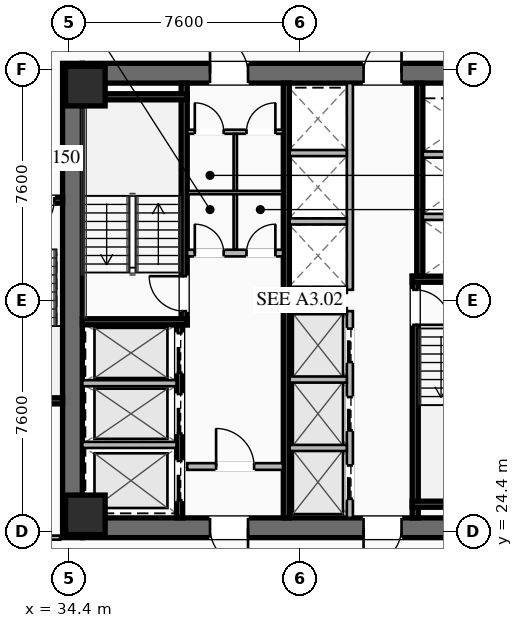
"""IFC4 building model, lengths in metres.
Left out: names, types, materials, properties, quantities, classifications, styles, units other than length and angle.
Written with IfcOpenShell. Run it as: python <this file> out.ifc"""

import sys

from ifc_helpers import new_model, si_unit, direction, frame, frame_2d, origin, origin_2d, place, context, subcontext, project, spatial, rectangle, hollow_rectangle, extrude, element, fill, save


model = new_model("IFC4")
c1 = context("Model", 3, precision=1e-05, world=origin(), true_north=direction((0.0, 1.0)))
c2 = subcontext(c1, "Body", "Model", "MODEL_VIEW")
j1 = project(units=[si_unit("LENGTHUNIT", "METRE"), si_unit("PLANEANGLEUNIT", "RADIAN")], contexts=[c1])
p1 = place(None, origin())
s1 = spatial("IfcSite", under=j1, at=p1, CompositionType="ELEMENT")
p2 = place(p1, origin())
s2 = spatial("IfcBuilding", under=s1, at=p2, CompositionType="ELEMENT")
p3 = place(p2, frame((0.0, 0.0, 31.7)))
s3 = spatial("IfcBuildingStorey", under=s2, at=p3, CompositionType="ELEMENT", Elevation=31.7)
p4 = place(p3, frame((34.525, 24.2, 0.0), z_axis=(0.0, 0.0, 1.0), x_axis=(0.0, 1.0, 0.0)))
e1 = element("IfcWall", 1, at=p4, inside=s3, PredefinedType="SHEAR", context=c2, shape_type="SweptSolid", body=[
    extrude(rectangle(XDim=15.6, YDim=0.65, at=frame_2d((7.8, 0.0))), origin(), (0.0, 0.0, 1.0), 3.55),
])
p5 = place(p3, frame((49.15, 24.525, 0.0), z_axis=(0.0, 0.0, 1.0), x_axis=(-1.0, 0.0, 0.0)))
e2 = element("IfcWall", 2, at=p5, inside=s3, PredefinedType="SHEAR", context=c2, shape_type="SweptSolid", body=[
    extrude(rectangle(XDim=14.3, YDim=0.65, at=frame_2d((7.15, 0.0))), origin(), (0.0, 0.0, 1.0), 3.55),
])
p6 = place(p5, frame((8.85, 0.0, 0.0)))
e3 = element("IfcOpeningElement", 3, at=p6, cuts=e2, PredefinedType="OPENING", context=c2, shape_type="SweptSolid", body=[
    extrude(rectangle(XDim=1.25, YDim=2.25, at=frame_2d((0.625, 1.125))), frame((0.0, 0.335, 0.0), z_axis=(0.0, -1.0, 0.0), x_axis=(1.0, 0.0, 0.0)), (0.0, 0.0, 1.0), 0.67),
])
p7 = place(p5, frame((3.8, 0.0, 0.0)))
e4 = element("IfcOpeningElement", 4, at=p7, cuts=e2, PredefinedType="OPENING", context=c2, shape_type="SweptSolid", body=[
    extrude(rectangle(XDim=1.25, YDim=2.25, at=frame_2d((0.625, 1.125))), frame((0.0, 0.335, 0.0), z_axis=(0.0, -1.0, 0.0), x_axis=(1.0, 0.0, 0.0)), (0.0, 0.0, 1.0), 0.67),
])
p8 = place(p3, frame((34.85, 39.475, 0.0), z_axis=(0.0, 0.0, 1.0), x_axis=(1.0, 0.0, 0.0)))
e5 = element("IfcWall", 5, at=p8, inside=s3, PredefinedType="SHEAR", context=c2, shape_type="SweptSolid", body=[
    extrude(rectangle(XDim=14.3, YDim=0.65, at=frame_2d((7.15, 0.0))), origin(), (0.0, 0.0, 1.0), 3.55),
])
p9 = place(p8, frame((4.2, 0.0, 0.0)))
e6 = element("IfcOpeningElement", 6, at=p9, cuts=e5, PredefinedType="OPENING", context=c2, shape_type="SweptSolid", body=[
    extrude(rectangle(XDim=1.25, YDim=2.25, at=frame_2d((0.625, 1.125))), frame((0.0, 0.335, 0.0), z_axis=(0.0, -1.0, 0.0), x_axis=(1.0, 0.0, 0.0)), (0.0, 0.0, 1.0), 0.67),
])
p10 = place(p8, frame((9.25, 0.0, 0.0)))
e7 = element("IfcOpeningElement", 7, at=p10, cuts=e5, PredefinedType="OPENING", context=c2, shape_type="SweptSolid", body=[
    extrude(rectangle(XDim=1.25, YDim=2.25, at=frame_2d((0.625, 1.125))), frame((0.0, 0.335, 0.0), z_axis=(0.0, -1.0, 0.0), x_axis=(1.0, 0.0, 0.0)), (0.0, 0.0, 1.0), 0.67),
])
for number, where, z_axis, x_axis in (
    (8, (34.95, 24.95, 0.0), (0.0, 0.0, 1.0), (1.0, 0.0, 0.0)),
    (9, (34.95, 39.05, 0.0), (0.0, 0.0, 1.0), (1.0, 0.0, 0.0)),
):
    element("IfcColumn", number, at=place(p3, frame(where, z_axis=z_axis, x_axis=x_axis)), inside=s3, PredefinedType="COLUMN", context=c2, shape_type="SweptSolid", body=[
        extrude(hollow_rectangle(XDim=1.3, YDim=1.3, WallThickness=0.05, at=origin_2d()), origin(), (0.0, 0.0, 1.0), 3.35),
    ])
p11 = place(p3, frame((38.2, 31.2, 0.0), z_axis=(0.0, 0.0, 1.0), x_axis=(0.0, 1.0, 0.0)))
e10 = element("IfcWall", 10, at=p11, inside=s3, PredefinedType="SHEAR", context=c2, shape_type="SweptSolid", body=[
    extrude(rectangle(XDim=7.95, YDim=0.2, at=frame_2d((3.975, 0.0))), origin(), (0.0, 0.0, 1.0), 3.35),
])
p12 = place(p11, frame((0.45, 0.0, 0.0)))
e11 = element("IfcOpeningElement", 11, at=p12, cuts=e10, PredefinedType="OPENING", context=c2, shape_type="SweptSolid", body=[
    extrude(rectangle(XDim=1.15, YDim=2.2, at=frame_2d((0.575, 1.1))), frame((0.0, 0.11, 0.0), z_axis=(0.0, -1.0, 0.0), x_axis=(1.0, 0.0, 0.0)), (0.0, 0.0, 1.0), 0.22),
])
for number, where, z_axis, x_axis in (
    (12, (34.85, 31.3, 0.0), (0.0, 0.0, 1.0), (1.0, 0.0, 0.0)),
    (13, (34.85, 38.7, 0.0), (0.0, 0.0, 1.0), (1.0, 0.0, 0.0)),
):
    element("IfcWall", number, at=place(p3, frame(where, z_axis=z_axis, x_axis=x_axis)), inside=s3, PredefinedType="SHEAR", context=c2, shape_type="SweptSolid", body=[
        extrude(rectangle(XDim=3.45, YDim=0.2, at=frame_2d((1.725, 0.0))), origin(), (0.0, 0.0, 1.0), 3.35),
    ])
p13 = place(p3, frame((45.8, 32.8, 0.0), z_axis=(0.0, 0.0, 1.0), x_axis=(0.0, -1.0, 0.0)))
e14 = element("IfcWall", 14, at=p13, inside=s3, PredefinedType="SHEAR", context=c2, shape_type="SweptSolid", body=[
    extrude(rectangle(XDim=7.95, YDim=0.2, at=frame_2d((3.975, 0.0))), origin(), (0.0, 0.0, 1.0), 3.35),
])
p14 = place(p13, frame((0.45, 0.0, 0.0)))
e15 = element("IfcOpeningElement", 15, at=p14, cuts=e14, PredefinedType="OPENING", context=c2, shape_type="SweptSolid", body=[
    extrude(rectangle(XDim=1.15, YDim=2.2, at=frame_2d((0.575, 1.1))), frame((0.0, 0.11, 0.0), z_axis=(0.0, -1.0, 0.0), x_axis=(1.0, 0.0, 0.0)), (0.0, 0.0, 1.0), 0.22),
])
for number, where, z_axis, x_axis in (
    (16, (45.7, 32.7, 0.0), (0.0, 0.0, 1.0), (1.0, 0.0, 0.0)),
    (17, (45.7, 25.3, 0.0), (0.0, 0.0, 1.0), (1.0, 0.0, 0.0)),
):
    element("IfcWall", number, at=place(p3, frame(where, z_axis=z_axis, x_axis=x_axis)), inside=s3, PredefinedType="SHEAR", context=c2, shape_type="SweptSolid", body=[
        extrude(rectangle(XDim=3.45, YDim=0.2, at=frame_2d((1.725, 0.0))), origin(), (0.0, 0.0, 1.0), 3.35),
    ])
p15 = place(p3, frame((41.56, 24.85, 0.0), z_axis=(0.0, 0.0, 1.0), x_axis=(0.0, 1.0, 0.0)))
e18 = element("IfcWall", 18, at=p15, inside=s3, PredefinedType="SHEAR", context=c2, shape_type="SweptSolid", body=[
    extrude(rectangle(XDim=14.3, YDim=0.2, at=frame_2d((7.15, 0.0))), origin(), (0.0, 0.0, 1.0), 3.35),
])
p16 = place(p3, frame((38.3, 33.56, 0.0), z_axis=(0.0, 0.0, 1.0), x_axis=(1.0, 0.0, 0.0)))
e19 = element("IfcWall", 19, at=p16, inside=s3, PredefinedType="SOLIDWALL", context=c2, shape_type="SweptSolid", body=[
    extrude(rectangle(XDim=3.15, YDim=0.22, at=frame_2d((1.575, 0.0))), origin(), (0.0, 0.0, 1.0), 2.703),
])
p17 = place(p16, frame((0.25, 0.0, 0.0)))
e20 = element("IfcOpeningElement", 20, at=p17, cuts=e19, PredefinedType="OPENING", context=c2, shape_type="SweptSolid", body=[
    extrude(rectangle(XDim=0.95, YDim=2.05, at=frame_2d((0.475, 1.025))), frame((0.0, 0.12, 0.0), z_axis=(0.0, -1.0, 0.0), x_axis=(1.0, 0.0, 0.0)), (0.0, 0.0, 1.0), 0.24),
])
p18 = place(p16, frame((1.95, 0.0, 0.0)))
e21 = element("IfcOpeningElement", 21, at=p18, cuts=e19, PredefinedType="OPENING", context=c2, shape_type="SweptSolid", body=[
    extrude(rectangle(XDim=0.95, YDim=2.05, at=frame_2d((0.475, 1.025))), frame((0.0, 0.12, 0.0), z_axis=(0.0, -1.0, 0.0), x_axis=(1.0, 0.0, 0.0)), (0.0, 0.0, 1.0), 0.24),
])
p19 = place(p3, frame((38.3, 26.54, 0.0), z_axis=(0.0, 0.0, 1.0), x_axis=(1.0, 0.0, 0.0)))
e22 = element("IfcWall", 22, at=p19, inside=s3, PredefinedType="SOLIDWALL", context=c2, shape_type="SweptSolid", body=[
    extrude(rectangle(XDim=3.15, YDim=0.22, at=frame_2d((1.575, 0.0))), origin(), (0.0, 0.0, 1.0), 2.703),
])
p20 = place(p19, frame((0.95, 0.0, 0.0)))
e23 = element("IfcOpeningElement", 23, at=p20, cuts=e22, PredefinedType="OPENING", context=c2, shape_type="SweptSolid", body=[
    extrude(rectangle(XDim=1.25, YDim=2.25, at=frame_2d((0.625, 1.125))), frame((0.0, 0.12, 0.0), z_axis=(0.0, -1.0, 0.0), x_axis=(1.0, 0.0, 0.0)), (0.0, 0.0, 1.0), 0.24),
])
p21 = place(p3, frame((38.05, 24.85, 0.0), z_axis=(0.0, 0.0, 1.0), x_axis=(0.0, 1.0, 0.0)))
e24 = element("IfcWall", 24, at=p21, inside=s3, PredefinedType="SHEAR", context=c2, shape_type="SweptSolid", body=[
    extrude(rectangle(XDim=6.35, YDim=0.2, at=frame_2d((3.175, 0.0))), origin(), (0.0, 0.0, 1.0), 3.35),
])
p22 = place(p21, frame((4.775, 0.0, 0.0)))
e25 = element("IfcOpeningElement", 25, at=p22, cuts=e24, PredefinedType="OPENING", context=c2, shape_type="SweptSolid", body=[
    extrude(rectangle(XDim=1.3, YDim=2.25, at=frame_2d((0.65, 1.125))), frame((0.0, 0.11, 0.0), z_axis=(0.0, -1.0, 0.0), x_axis=(1.0, 0.0, 0.0)), (0.0, 0.0, 1.0), 0.22),
])
p23 = place(p21, frame((2.775, 0.0, 0.0)))
e26 = element("IfcOpeningElement", 26, at=p23, cuts=e24, PredefinedType="OPENING", context=c2, shape_type="SweptSolid", body=[
    extrude(rectangle(XDim=1.3, YDim=2.25, at=frame_2d((0.65, 1.125))), frame((0.0, 0.11, 0.0), z_axis=(0.0, -1.0, 0.0), x_axis=(1.0, 0.0, 0.0)), (0.0, 0.0, 1.0), 0.22),
])
p24 = place(p21, frame((0.575, 0.0, 0.0)))
e27 = element("IfcOpeningElement", 27, at=p24, cuts=e24, PredefinedType="OPENING", context=c2, shape_type="SweptSolid", body=[
    extrude(rectangle(XDim=1.3, YDim=2.25, at=frame_2d((0.65, 1.125))), frame((0.0, 0.11, 0.0), z_axis=(0.0, -1.0, 0.0), x_axis=(1.0, 0.0, 0.0)), (0.0, 0.0, 1.0), 0.22),
])
for number, where, z_axis, x_axis in (
    (28, (34.85, 27.25, 0.0), (0.0, 0.0, 1.0), (1.0, 0.0, 0.0)),
    (29, (34.85, 29.28, 0.0), (0.0, 0.0, 1.0), (1.0, 0.0, 0.0)),
):
    element("IfcWall", number, at=place(p3, frame(where, z_axis=z_axis, x_axis=x_axis)), inside=s3, PredefinedType="SOLIDWALL", context=c2, shape_type="SweptSolid", body=[
        extrude(rectangle(XDim=3.1, YDim=0.2, at=frame_2d((1.55, 0.0))), origin(), (0.0, 0.0, 1.0), 3.35),
    ])
p25 = place(p3, frame((45.95, 39.15, 0.0), z_axis=(0.0, 0.0, 1.0), x_axis=(0.0, -1.0, 0.0)))
e30 = element("IfcWall", 30, at=p25, inside=s3, PredefinedType="SHEAR", context=c2, shape_type="SweptSolid", body=[
    extrude(rectangle(XDim=6.35, YDim=0.2, at=frame_2d((3.175, 0.0))), origin(), (0.0, 0.0, 1.0), 3.35),
])
for number, where, z_axis, x_axis in (
    (31, (46.05, 34.75, 0.0), (0.0, 0.0, 1.0), (1.0, 0.0, 0.0)),
    (32, (46.05, 36.8, 0.0), (0.0, 0.0, 1.0), (1.0, 0.0, 0.0)),
):
    element("IfcWall", number, at=place(p3, frame(where, z_axis=z_axis, x_axis=x_axis)), inside=s3, PredefinedType="SOLIDWALL", context=c2, shape_type="SweptSolid", body=[
        extrude(rectangle(XDim=3.1, YDim=0.2, at=frame_2d((1.55, 0.0))), origin(), (0.0, 0.0, 1.0), 3.35),
    ])
p26 = place(p3, frame((38.3, 37.55, 0.0), z_axis=(0.0, 0.0, 1.0), x_axis=(1.0, 0.0, 0.0)))
e33 = element("IfcWall", 33, at=p26, inside=s3, PredefinedType="PARTITIONING", context=c2, shape_type="SweptSolid", body=[
    extrude(rectangle(XDim=3.15, YDim=0.135, at=frame_2d((1.575, 0.0))), origin(), (0.0, 0.0, 1.0), 2.703),
])
p27 = place(p26, frame((0.25, 0.0, 0.0)))
e34 = element("IfcOpeningElement", 34, at=p27, cuts=e33, PredefinedType="OPENING", context=c2, shape_type="SweptSolid", body=[
    extrude(rectangle(XDim=0.95, YDim=2.05, at=frame_2d((0.475, 1.025))), frame((0.0, 0.077, 0.0), z_axis=(0.0, -1.0, 0.0), x_axis=(1.0, 0.0, 0.0)), (0.0, 0.0, 1.0), 0.155),
])
p28 = place(p26, frame((1.95, 0.0, 0.0)))
e35 = element("IfcOpeningElement", 35, at=p28, cuts=e33, PredefinedType="OPENING", context=c2, shape_type="SweptSolid", body=[
    extrude(rectangle(XDim=0.95, YDim=2.05, at=frame_2d((0.475, 1.025))), frame((0.0, 0.077, 0.0), z_axis=(0.0, -1.0, 0.0), x_axis=(1.0, 0.0, 0.0)), (0.0, 0.0, 1.0), 0.155),
])
p29 = place(p3, frame((39.88, 33.68, 0.0), z_axis=(0.0, 0.0, 1.0), x_axis=(0.0, 1.0, 0.0)))
e36 = element("IfcWall", 36, at=p29, inside=s3, PredefinedType="PARTITIONING", context=c2, shape_type="SweptSolid", body=[
    extrude(rectangle(XDim=3.8, YDim=0.11, at=frame_2d((1.9, 0.0))), origin(), (0.0, 0.0, 1.0), 2.703),
])
p30 = place(p3, frame((38.3, 35.55, 0.0), z_axis=(0.0, 0.0, 1.0), x_axis=(1.0, 0.0, 0.0)))
e37 = element("IfcWall", 37, at=p30, inside=s3, PredefinedType="PARTITIONING", context=c2, shape_type="SweptSolid", body=[
    extrude(rectangle(XDim=3.15, YDim=0.11, at=frame_2d((1.575, 0.0))), origin(), (0.0, 0.0, 1.0), 2.703),
])
p31 = place(p3, frame((43.65, 24.85, 0.0), z_axis=(0.0, 0.0, 1.0), x_axis=(0.0, 1.0, 0.0)))
e38 = element("IfcWall", 38, at=p31, inside=s3, PredefinedType="SOLIDWALL", context=c2, shape_type="SweptSolid", body=[
    extrude(rectangle(XDim=6.8, YDim=0.2, at=frame_2d((3.4, 0.0))), origin(), (0.0, 0.0, 1.0), 3.35),
])
p32 = place(p31, frame((0.625, 0.0, 0.0)))
e39 = element("IfcOpeningElement", 39, at=p32, cuts=e38, PredefinedType="OPENING", context=c2, shape_type="SweptSolid", body=[
    extrude(rectangle(XDim=1.1, YDim=2.2, at=frame_2d((0.55, 1.1))), frame((0.0, 0.11, 0.0), z_axis=(0.0, -1.0, 0.0), x_axis=(1.0, 0.0, 0.0)), (0.0, 0.0, 1.0), 0.22),
])
p33 = place(p31, frame((2.875, 0.0, 0.0)))
e40 = element("IfcOpeningElement", 40, at=p33, cuts=e38, PredefinedType="OPENING", context=c2, shape_type="SweptSolid", body=[
    extrude(rectangle(XDim=1.1, YDim=2.2, at=frame_2d((0.55, 1.1))), frame((0.0, 0.11, 0.0), z_axis=(0.0, -1.0, 0.0), x_axis=(1.0, 0.0, 0.0)), (0.0, 0.0, 1.0), 0.22),
])
p34 = place(p31, frame((5.125, 0.0, 0.0)))
e41 = element("IfcOpeningElement", 41, at=p34, cuts=e38, PredefinedType="OPENING", context=c2, shape_type="SweptSolid", body=[
    extrude(rectangle(XDim=1.1, YDim=2.2, at=frame_2d((0.55, 1.1))), frame((0.0, 0.11, 0.0), z_axis=(0.0, -1.0, 0.0), x_axis=(1.0, 0.0, 0.0)), (0.0, 0.0, 1.0), 0.22),
])
for number, where, z_axis, x_axis in (
    (42, (41.67, 27.15, 0.0), (0.0, 0.0, 1.0), (1.0, 0.0, 0.0)),
    (43, (41.67, 29.4, 0.0), (0.0, 0.0, 1.0), (1.0, 0.0, 0.0)),
    (44, (41.67, 31.65, 0.0), (0.0, 0.0, 1.0), (1.0, 0.0, 0.0)),
):
    element("IfcWall", number, at=place(p3, frame(where, z_axis=z_axis, x_axis=x_axis)), inside=s3, PredefinedType="SOLIDWALL", context=c2, shape_type="SweptSolid", body=[
        extrude(rectangle(XDim=1.88, YDim=0.2, at=frame_2d((0.94, 0.0))), origin(), (0.0, 0.0, 1.0), 3.35),
    ])
p35 = place(p3, frame((43.65, 32.35, 0.0), z_axis=(0.0, 0.0, 1.0), x_axis=(0.0, 1.0, 0.0)))
e45 = element("IfcWall", 45, at=p35, inside=s3, PredefinedType="SOLIDWALL", context=c2, shape_type="SweptSolid", body=[
    extrude(rectangle(XDim=6.8, YDim=0.2, at=frame_2d((3.4, 0.0))), origin(), (0.0, 0.0, 1.0), 3.35),
])
for number, where, z_axis, x_axis in (
    (46, (41.67, 32.35, 0.0), (0.0, 0.0, 1.0), (1.0, 0.0, 0.0)),
    (47, (41.67, 34.6, 0.0), (0.0, 0.0, 1.0), (1.0, 0.0, 0.0)),
    (48, (41.67, 36.85, 0.0), (0.0, 0.0, 1.0), (1.0, 0.0, 0.0)),
):
    element("IfcWall", number, at=place(p3, frame(where, z_axis=z_axis, x_axis=x_axis)), inside=s3, PredefinedType="SOLIDWALL", context=c2, shape_type="SweptSolid", body=[
        extrude(rectangle(XDim=1.88, YDim=0.2, at=frame_2d((0.94, 0.0))), origin(), (0.0, 0.0, 1.0), 3.35),
    ])
p36 = place(p3, frame((34.2, 35.3, 0.0), z_axis=(0.0, 0.0, 1.0), x_axis=(-1.0, 0.0, 0.0)))
e49 = element("IfcWall", 49, at=p36, inside=s3, PredefinedType="SHEAR", context=c2, shape_type="SweptSolid", body=[
    extrude(rectangle(XDim=3.4, YDim=0.2, at=frame_2d((1.7, 0.0))), origin(), (0.0, 0.0, 1.0), 3.35),
])
p37 = place(p36, frame((0.275, 0.0, 0.0)))
e50 = element("IfcOpeningElement", 50, at=p37, cuts=e49, PredefinedType="OPENING", context=c2, shape_type="SweptSolid", body=[
    extrude(rectangle(XDim=1.15, YDim=2.2, at=frame_2d((0.575, 1.1))), frame((0.0, 0.11, 0.0), z_axis=(0.0, -1.0, 0.0), x_axis=(1.0, 0.0, 0.0)), (0.0, 0.0, 1.0), 0.22),
])
p38 = place(p3, frame((30.8, 28.7, 0.0), z_axis=(0.0, 0.0, 1.0), x_axis=(1.0, 0.0, 0.0)))
e51 = element("IfcWall", 51, at=p38, inside=s3, PredefinedType="SHEAR", context=c2, shape_type="SweptSolid", body=[
    extrude(rectangle(XDim=3.4, YDim=0.2, at=frame_2d((1.7, 0.0))), origin(), (0.0, 0.0, 1.0), 3.35),
])
p39 = place(p3, frame((19.12, 24.2, 0.0), z_axis=(0.0, 0.0, 1.0), x_axis=(1.0, 0.0, 0.0)))
e52 = element("IfcWall", 52, at=p39, inside=s3, PredefinedType="PARTITIONING", context=c2, shape_type="SweptSolid", body=[
    extrude(rectangle(XDim=15.0, YDim=0.135, at=frame_2d((7.5, 0.0))), origin(), (0.0, 0.0, 1.0), 2.703),
])
p40 = place(p39, frame((12.005, 0.0, 0.0)))
e53 = element("IfcOpeningElement", 53, at=p40, cuts=e52, PredefinedType="OPENING", context=c2, shape_type="SweptSolid", body=[
    extrude(rectangle(XDim=0.95, YDim=2.05, at=frame_2d((0.475, 1.025))), frame((0.0, 0.077, 0.0), z_axis=(0.0, -1.0, 0.0), x_axis=(1.0, 0.0, 0.0)), (0.0, 0.0, 1.0), 0.155),
])
p41 = place(p9, origin())
e54 = element("IfcDoor", 54, at=p41, inside=s3, OperationType="SINGLE_SWING_LEFT", PredefinedType="DOOR", context=c2, shape_type="SweptSolid", body=[
    extrude(rectangle(XDim=1.25, YDim=2.25, at=frame_2d((0.625, 1.125))), frame((0.0, 0.025, 0.0), z_axis=(0.0, -1.0, 0.0), x_axis=(1.0, 0.0, 0.0)), (0.0, 0.0, 1.0), 0.05),
])
fill(e6, e54)
p42 = place(p10, origin())
e55 = element("IfcDoor", 55, at=p42, inside=s3, OperationType="SINGLE_SWING_RIGHT", PredefinedType="DOOR", context=c2, shape_type="SweptSolid", body=[
    extrude(rectangle(XDim=1.25, YDim=2.25, at=frame_2d((0.625, 1.125))), frame((0.0, 0.025, 0.0), z_axis=(0.0, -1.0, 0.0), x_axis=(1.0, 0.0, 0.0)), (0.0, 0.0, 1.0), 0.05),
])
fill(e7, e55)
p43 = place(p6, origin())
e56 = element("IfcDoor", 56, at=p43, inside=s3, OperationType="SINGLE_SWING_LEFT", PredefinedType="DOOR", context=c2, shape_type="SweptSolid", body=[
    extrude(rectangle(XDim=1.25, YDim=2.25, at=frame_2d((0.625, 1.125))), frame((0.0, 0.025, 0.0), z_axis=(0.0, -1.0, 0.0), x_axis=(1.0, 0.0, 0.0)), (0.0, 0.0, 1.0), 0.05),
])
fill(e3, e56)
p44 = place(p7, origin())
e57 = element("IfcDoor", 57, at=p44, inside=s3, OperationType="SINGLE_SWING_RIGHT", PredefinedType="DOOR", context=c2, shape_type="SweptSolid", body=[
    extrude(rectangle(XDim=1.25, YDim=2.25, at=frame_2d((0.625, 1.125))), frame((0.0, 0.025, 0.0), z_axis=(0.0, -1.0, 0.0), x_axis=(1.0, 0.0, 0.0)), (0.0, 0.0, 1.0), 0.05),
])
fill(e4, e57)
p45 = place(p12, origin())
e58 = element("IfcDoor", 58, at=p45, inside=s3, OperationType="SINGLE_SWING_RIGHT", PredefinedType="DOOR", context=c2, shape_type="SweptSolid", body=[
    extrude(rectangle(XDim=1.15, YDim=2.2, at=frame_2d((0.575, 1.1))), frame((0.0, 0.025, 0.0), z_axis=(0.0, -1.0, 0.0), x_axis=(1.0, 0.0, 0.0)), (0.0, 0.0, 1.0), 0.05),
])
fill(e11, e58)
p46 = place(p14, origin())
e59 = element("IfcDoor", 59, at=p46, inside=s3, OperationType="SINGLE_SWING_RIGHT", PredefinedType="DOOR", context=c2, shape_type="SweptSolid", body=[
    extrude(rectangle(XDim=1.15, YDim=2.2, at=frame_2d((0.575, 1.1))), frame((0.0, 0.025, 0.0), z_axis=(0.0, -1.0, 0.0), x_axis=(1.0, 0.0, 0.0)), (0.0, 0.0, 1.0), 0.05),
])
fill(e15, e59)
p47 = place(p20, origin())
e60 = element("IfcDoor", 60, at=p47, inside=s3, OperationType="SINGLE_SWING_LEFT", PredefinedType="DOOR", context=c2, shape_type="SweptSolid", body=[
    extrude(rectangle(XDim=1.25, YDim=2.25, at=frame_2d((0.625, 1.125))), frame((0.0, 0.025, 0.0), z_axis=(0.0, -1.0, 0.0), x_axis=(1.0, 0.0, 0.0)), (0.0, 0.0, 1.0), 0.05),
])
fill(e23, e60)
p48 = place(p27, origin())
e61 = element("IfcDoor", 61, at=p48, inside=s3, OperationType="SINGLE_SWING_LEFT", PredefinedType="DOOR", context=c2, shape_type="SweptSolid", body=[
    extrude(rectangle(XDim=0.95, YDim=2.05, at=frame_2d((0.475, 1.025))), frame((0.0, 0.025, 0.0), z_axis=(0.0, -1.0, 0.0), x_axis=(1.0, 0.0, 0.0)), (0.0, 0.0, 1.0), 0.05),
])
fill(e34, e61)
p49 = place(p28, origin())
e62 = element("IfcDoor", 62, at=p49, inside=s3, OperationType="SINGLE_SWING_RIGHT", PredefinedType="DOOR", context=c2, shape_type="SweptSolid", body=[
    extrude(rectangle(XDim=0.95, YDim=2.05, at=frame_2d((0.475, 1.025))), frame((0.0, 0.025, 0.0), z_axis=(0.0, -1.0, 0.0), x_axis=(1.0, 0.0, 0.0)), (0.0, 0.0, 1.0), 0.05),
])
fill(e35, e62)
p50 = place(p17, origin())
e63 = element("IfcDoor", 63, at=p50, inside=s3, OperationType="SINGLE_SWING_LEFT", PredefinedType="DOOR", context=c2, shape_type="SweptSolid", body=[
    extrude(rectangle(XDim=0.95, YDim=2.05, at=frame_2d((0.475, 1.025))), frame((0.0, 0.025, 0.0), z_axis=(0.0, -1.0, 0.0), x_axis=(1.0, 0.0, 0.0)), (0.0, 0.0, 1.0), 0.05),
])
fill(e20, e63)
p51 = place(p18, origin())
e64 = element("IfcDoor", 64, at=p51, inside=s3, OperationType="SINGLE_SWING_RIGHT", PredefinedType="DOOR", context=c2, shape_type="SweptSolid", body=[
    extrude(rectangle(XDim=0.95, YDim=2.05, at=frame_2d((0.475, 1.025))), frame((0.0, 0.025, 0.0), z_axis=(0.0, -1.0, 0.0), x_axis=(1.0, 0.0, 0.0)), (0.0, 0.0, 1.0), 0.05),
])
fill(e21, e64)
p52 = place(p37, origin())
e65 = element("IfcDoor", 65, at=p52, inside=s3, OperationType="SINGLE_SWING_RIGHT", PredefinedType="DOOR", context=c2, shape_type="SweptSolid", body=[
    extrude(rectangle(XDim=1.15, YDim=2.2, at=frame_2d((0.575, 1.1))), frame((0.0, 0.025, 0.0), z_axis=(0.0, -1.0, 0.0), x_axis=(1.0, 0.0, 0.0)), (0.0, 0.0, 1.0), 0.05),
])
fill(e50, e65)
p53 = place(p22, origin())
e66 = element("IfcDoor", 66, at=p53, inside=s3, OperationType="SLIDING_TO_LEFT", PredefinedType="DOOR", context=c2, shape_type="SweptSolid", body=[
    extrude(rectangle(XDim=1.3, YDim=2.25, at=frame_2d((0.65, 1.125))), frame((0.0, 0.025, 0.0), z_axis=(0.0, -1.0, 0.0), x_axis=(1.0, 0.0, 0.0)), (0.0, 0.0, 1.0), 0.05),
])
fill(e25, e66)
p54 = place(p23, origin())
e67 = element("IfcDoor", 67, at=p54, inside=s3, OperationType="SLIDING_TO_LEFT", PredefinedType="DOOR", context=c2, shape_type="SweptSolid", body=[
    extrude(rectangle(XDim=1.3, YDim=2.25, at=frame_2d((0.65, 1.125))), frame((0.0, 0.025, 0.0), z_axis=(0.0, -1.0, 0.0), x_axis=(1.0, 0.0, 0.0)), (0.0, 0.0, 1.0), 0.05),
])
fill(e26, e67)
p55 = place(p24, origin())
e68 = element("IfcDoor", 68, at=p55, inside=s3, OperationType="SLIDING_TO_LEFT", PredefinedType="DOOR", context=c2, shape_type="SweptSolid", body=[
    extrude(rectangle(XDim=1.3, YDim=2.25, at=frame_2d((0.65, 1.125))), frame((0.0, 0.025, 0.0), z_axis=(0.0, -1.0, 0.0), x_axis=(1.0, 0.0, 0.0)), (0.0, 0.0, 1.0), 0.05),
])
fill(e27, e68)
p56 = place(p32, origin())
e69 = element("IfcDoor", 69, at=p56, inside=s3, OperationType="SLIDING_TO_LEFT", PredefinedType="DOOR", context=c2, shape_type="SweptSolid", body=[
    extrude(rectangle(XDim=1.1, YDim=2.2, at=frame_2d((0.55, 1.1))), frame((0.0, 0.025, 0.0), z_axis=(0.0, -1.0, 0.0), x_axis=(1.0, 0.0, 0.0)), (0.0, 0.0, 1.0), 0.05),
])
fill(e39, e69)
p57 = place(p33, origin())
e70 = element("IfcDoor", 70, at=p57, inside=s3, OperationType="SLIDING_TO_LEFT", PredefinedType="DOOR", context=c2, shape_type="SweptSolid", body=[
    extrude(rectangle(XDim=1.1, YDim=2.2, at=frame_2d((0.55, 1.1))), frame((0.0, 0.025, 0.0), z_axis=(0.0, -1.0, 0.0), x_axis=(1.0, 0.0, 0.0)), (0.0, 0.0, 1.0), 0.05),
])
fill(e40, e70)
p58 = place(p34, origin())
e71 = element("IfcDoor", 71, at=p58, inside=s3, OperationType="SLIDING_TO_LEFT", PredefinedType="DOOR", context=c2, shape_type="SweptSolid", body=[
    extrude(rectangle(XDim=1.1, YDim=2.2, at=frame_2d((0.55, 1.1))), frame((0.0, 0.025, 0.0), z_axis=(0.0, -1.0, 0.0), x_axis=(1.0, 0.0, 0.0)), (0.0, 0.0, 1.0), 0.05),
])
fill(e41, e71)
save(model, sys.argv[1])
